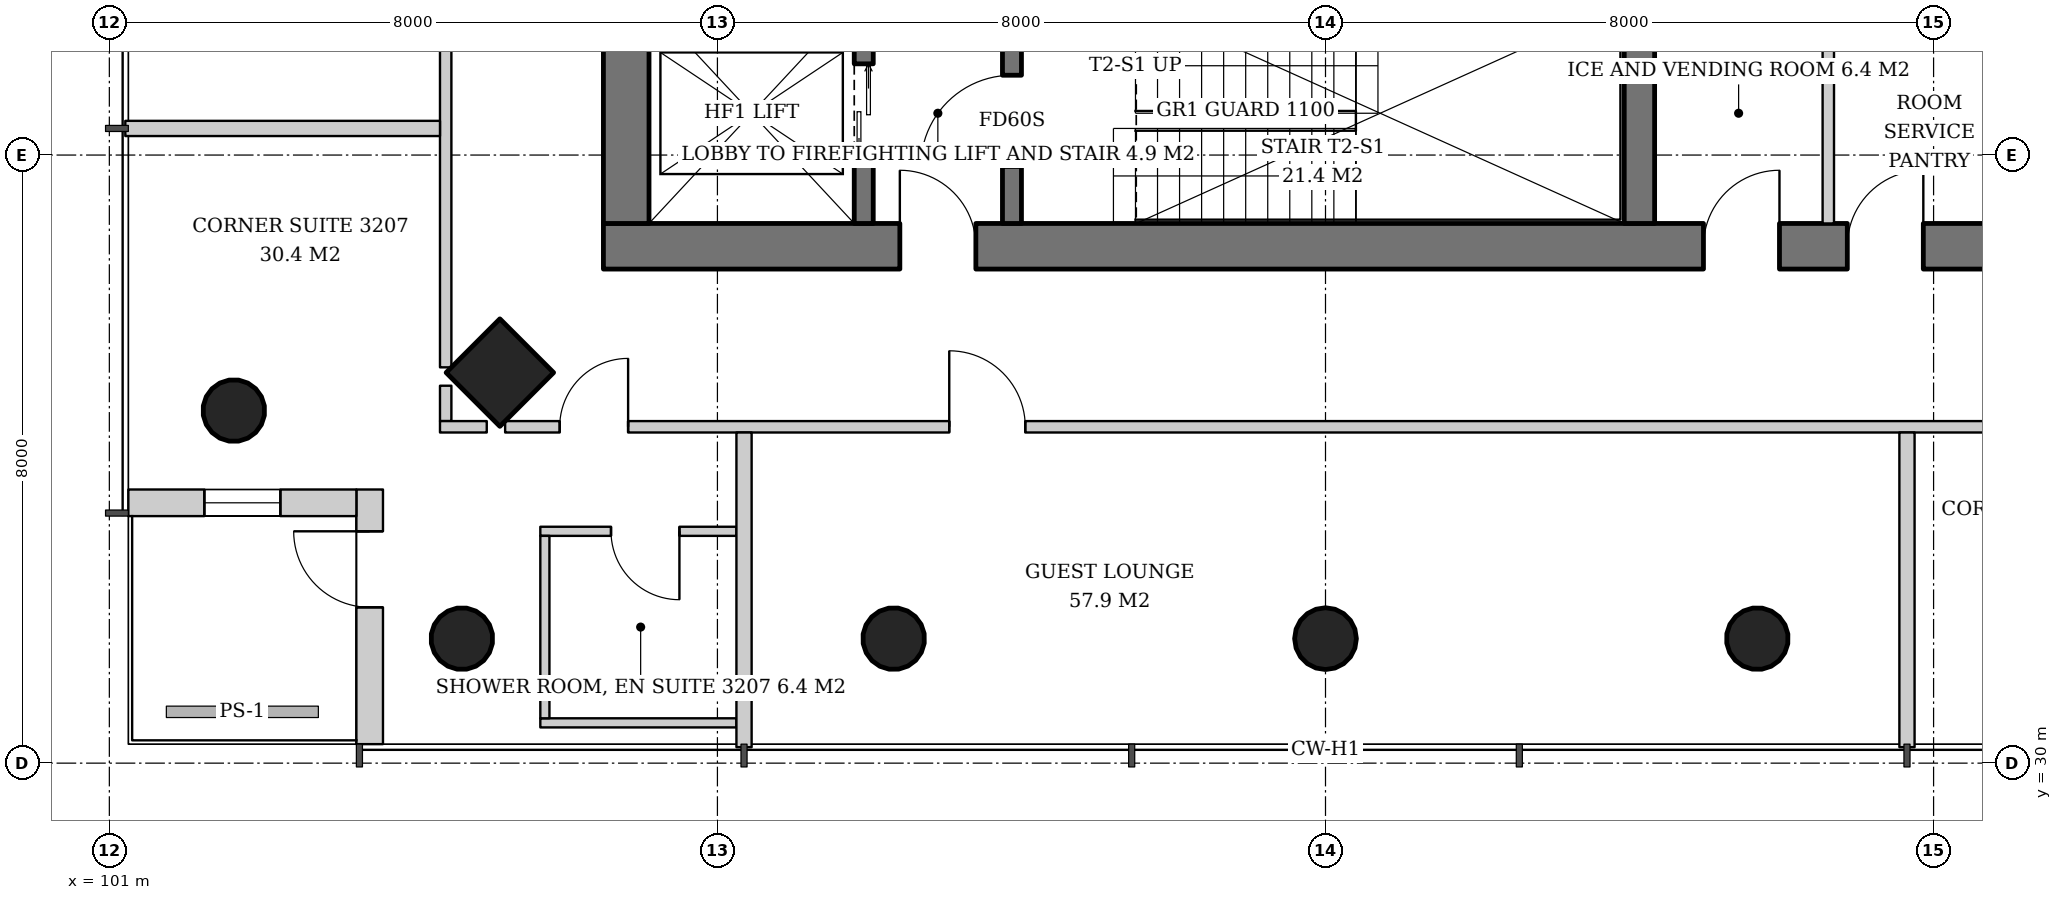
"""IFC4 building model, lengths in metres.
Left out: names, types, materials, properties, quantities, classifications, styles, units other than length and angle.
Written with IfcOpenShell. Run it as: python <this file> out.ifc"""

import sys

from ifc_helpers import new_model, si_unit, direction, frame, frame_2d, origin, origin_2d, place, context, subcontext, project, spatial, rectangle, hollow_circle, extrude, element, fill, save


model = new_model("IFC4")
c1 = context("Model", 3, precision=1e-05, world=origin(), true_north=direction((0.0, 1.0)))
c2 = subcontext(c1, "Body", "Model", "MODEL_VIEW")
j1 = project(units=[si_unit("LENGTHUNIT", "METRE"), si_unit("PLANEANGLEUNIT", "RADIAN")], contexts=[c1])
p1 = place(None, origin())
s1 = spatial("IfcSite", under=j1, at=p1, CompositionType="ELEMENT")
p2 = place(p1, origin())
s2 = spatial("IfcBuilding", under=s1, at=p2, CompositionType="ELEMENT")
p3 = place(p2, frame((0.0, 0.0, 127.4)))
s3 = spatial("IfcBuildingStorey", under=s2, at=p3, CompositionType="ELEMENT", Elevation=127.4)
p4 = place(p3, frame((106.086, 35.086, 0.0), z_axis=(0.043029647111, 0.043029647111, 0.998146732169), x_axis=(-0.707106781187, 0.707106781187, 0.0)))
e1 = element("IfcColumn", 1, at=p4, inside=s3, PredefinedType="COLUMN", context=c2, shape_type="SweptSolid", body=[
    extrude(rectangle(XDim=1.0, YDim=1.0, at=origin_2d()), origin(), (0.0, 0.0, 1.0), 3.807),
])
for number, where, z_axis, x_axis in (
    (2, (102.586, 34.586, 0.0), (0.043, 0.043, 0.998), (-0.707, 0.707, 0.0)),
    (3, (105.586, 31.586, 0.0), (0.043, 0.043, 0.998), (-0.707, 0.707, 0.0)),
):
    element("IfcColumn", number, at=place(p3, frame(where, z_axis=z_axis, x_axis=x_axis)), inside=s3, PredefinedType="COLUMN", context=c2, shape_type="SweptSolid", body=[
        extrude(hollow_circle(Radius=0.406, WallThickness=0.03, at=origin_2d()), origin(), (0.0, 0.0, 1.0), 3.807),
    ])
p5 = place(p3, frame((111.293, 31.586, 0.0), z_axis=(0.021497706284, 0.043059584825, 0.998841188968), x_axis=(-0.894693706707, 0.446680166538, 0.0)))
e4 = element("IfcColumn", 4, at=p5, inside=s3, PredefinedType="COLUMN", context=c2, shape_type="SweptSolid", body=[
    extrude(hollow_circle(Radius=0.406, WallThickness=0.03, at=origin_2d()), origin(), (0.0, 0.0, 1.0), 3.804),
])
p6 = place(p3, frame((117.0, 31.586, 0.0), z_axis=(0.0, 0.043069538298, 0.999072076915), x_axis=(-1.0, 0.0, 0.0)))
e5 = element("IfcColumn", 5, at=p6, inside=s3, PredefinedType="COLUMN", context=c2, shape_type="SweptSolid", body=[
    extrude(hollow_circle(Radius=0.406, WallThickness=0.03, at=origin_2d()), origin(), (0.0, 0.0, 1.0), 3.803),
])
p7 = place(p3, frame((122.707, 31.586, 0.0), z_axis=(-0.021497706284, 0.043059584825, 0.998841188968), x_axis=(-0.894693706707, -0.446680166538, 0.0)))
e6 = element("IfcColumn", 6, at=p7, inside=s3, PredefinedType="COLUMN", context=c2, shape_type="SweptSolid", body=[
    extrude(hollow_circle(Radius=0.406, WallThickness=0.03, at=origin_2d()), origin(), (0.0, 0.0, 1.0), 3.804),
])
p8 = place(p3, frame((107.5, 36.8, 0.0), z_axis=(0.0, 0.0, 1.0), x_axis=(1.0, 0.0, 0.0)))
e7 = element("IfcWall", 7, at=p8, inside=s3, PredefinedType="SHEAR", context=c2, shape_type="SweptSolid", body=[
    extrude(rectangle(XDim=19.0, YDim=0.6, at=frame_2d((9.5, 0.0))), origin(), (0.0, 0.0, 1.0), 3.8),
])
p9 = place(p8, frame((3.9, 0.0, 0.0)))
e8 = element("IfcOpeningElement", 8, at=p9, cuts=e7, PredefinedType="OPENING", context=c2, shape_type="SweptSolid", body=[
    extrude(rectangle(XDim=1.0, YDim=2.1, at=frame_2d((0.5, 1.05))), frame((0.0, 0.31, 0.0), z_axis=(0.0, -1.0, 0.0), x_axis=(1.0, 0.0, 0.0)), (0.0, 0.0, 1.0), 0.62),
])
p10 = place(p8, frame((14.472, 0.0, 0.0)))
e9 = element("IfcOpeningElement", 9, at=p10, cuts=e7, PredefinedType="OPENING", context=c2, shape_type="SweptSolid", body=[
    extrude(rectangle(XDim=1.0, YDim=2.1, at=frame_2d((0.5, 1.05))), frame((0.0, 0.31, 0.0), z_axis=(0.0, -1.0, 0.0), x_axis=(1.0, 0.0, 0.0)), (0.0, 0.0, 1.0), 0.62),
])
p11 = place(p8, frame((16.365, 0.0, 0.0)))
e10 = element("IfcOpeningElement", 10, at=p11, cuts=e7, PredefinedType="OPENING", context=c2, shape_type="SweptSolid", body=[
    extrude(rectangle(XDim=1.0, YDim=2.1, at=frame_2d((0.5, 1.05))), frame((0.0, 0.31, 0.0), z_axis=(0.0, -1.0, 0.0), x_axis=(1.0, 0.0, 0.0)), (0.0, 0.0, 1.0), 0.62),
])
p12 = place(p3, frame((107.8, 37.1, 0.0), z_axis=(0.0, 0.0, 1.0), x_axis=(0.0, 1.0, 0.0)))
e11 = element("IfcWall", 11, at=p12, inside=s3, PredefinedType="SHEAR", context=c2, shape_type="SweptSolid", body=[
    extrude(rectangle(XDim=17.8, YDim=0.6, at=frame_2d((8.9, 0.0))), origin(), (0.0, 0.0, 1.0), 3.8),
])
p13 = place(p12, frame((8.0, 0.0, 0.0)))
e12 = element("IfcOpeningElement", 12, at=p13, cuts=e11, PredefinedType="OPENING", context=c2, shape_type="SweptSolid", body=[
    extrude(rectangle(XDim=1.8, YDim=2.4, at=frame_2d((0.9, 1.2))), frame((0.0, 0.31, 0.0), z_axis=(0.0, -1.0, 0.0), x_axis=(1.0, 0.0, 0.0)), (0.0, 0.0, 1.0), 0.62),
])
p14 = place(p3, frame((121.13, 37.1, 0.0), z_axis=(0.0, 0.0, 1.0), x_axis=(0.0, 1.0, 0.0)))
e13 = element("IfcWall", 13, at=p14, inside=s3, PredefinedType="SHEAR", context=c2, shape_type="SweptSolid", body=[
    extrude(rectangle(XDim=2.9, YDim=0.4, at=frame_2d((1.45, 0.0))), origin(), (0.0, 0.0, 1.0), 3.8),
])
p15 = place(p3, frame((104.425, 30.25, 0.0), z_axis=(0.0, 0.0, 1.0), x_axis=(0.0, 1.0, 0.0)))
e14 = element("IfcWall", 14, at=p15, inside=s3, PredefinedType="SOLIDWALL", context=c2, shape_type="SweptSolid", body=[
    extrude(rectangle(XDim=3.35, YDim=0.35, at=frame_2d((1.675, 0.0))), origin(), (0.0, 0.0, 1.0), 3.35),
])
p16 = place(p15, frame((1.8, 0.0, 0.0)))
e15 = element("IfcOpeningElement", 15, at=p16, cuts=e14, PredefinedType="OPENING", context=c2, shape_type="SweptSolid", body=[
    extrude(rectangle(XDim=1.0, YDim=2.4, at=frame_2d((0.5, 1.2))), frame((0.0, 0.185, 0.0), z_axis=(0.0, -1.0, 0.0), x_axis=(1.0, 0.0, 0.0)), (0.0, 0.0, 1.0), 0.37),
])
p17 = place(p3, frame((104.25, 33.425, 0.0), z_axis=(0.0, 0.0, 1.0), x_axis=(-1.0, 0.0, 0.0)))
e16 = element("IfcWall", 16, at=p17, inside=s3, PredefinedType="SOLIDWALL", context=c2, shape_type="SweptSolid", body=[
    extrude(rectangle(XDim=3.0, YDim=0.35, at=frame_2d((1.5, 0.0))), origin(), (0.0, 0.0, 1.0), 3.35),
])
p18 = place(p17, frame((1.0, 0.0, 0.65)))
e17 = element("IfcOpeningElement", 17, at=p18, cuts=e16, PredefinedType="OPENING", context=c2, shape_type="SweptSolid", body=[
    extrude(rectangle(XDim=1.0, YDim=2.4, at=frame_2d((0.5, 1.2))), frame((0.0, 0.185, 0.0), z_axis=(0.0, -1.0, 0.0), x_axis=(1.0, 0.0, 0.0)), (0.0, 0.0, 1.0), 0.37),
])
p19 = place(p3, frame((110.925, 37.1, 0.0), z_axis=(0.0, 0.0, 1.0), x_axis=(0.0, 1.0, 0.0)))
e18 = element("IfcWall", 18, at=p19, inside=s3, PredefinedType="SHEAR", context=c2, shape_type="SweptSolid", body=[
    extrude(rectangle(XDim=2.9, YDim=0.25, at=frame_2d((1.45, 0.0))), origin(), (0.0, 0.0, 1.0), 3.8),
])
p20 = place(p19, frame((0.8, 0.0, 0.0)))
e19 = element("IfcOpeningElement", 19, at=p20, cuts=e18, PredefinedType="OPENING", context=c2, shape_type="SweptSolid", body=[
    extrude(rectangle(XDim=1.3, YDim=2.2, at=frame_2d((0.65, 1.1))), frame((0.0, 0.135, 0.0), z_axis=(0.0, -1.0, 0.0), x_axis=(1.0, 0.0, 0.0)), (0.0, 0.0, 1.0), 0.27),
])
p21 = place(p3, frame((112.875, 37.1, 0.0), z_axis=(0.0, 0.0, 1.0), x_axis=(0.0, 1.0, 0.0)))
e20 = element("IfcWall", 20, at=p21, inside=s3, PredefinedType="SHEAR", context=c2, shape_type="SweptSolid", body=[
    extrude(rectangle(XDim=2.9, YDim=0.25, at=frame_2d((1.45, 0.0))), origin(), (0.0, 0.0, 1.0), 3.8),
])
p22 = place(p21, frame((0.75, 0.0, 0.0)))
e21 = element("IfcOpeningElement", 21, at=p22, cuts=e20, PredefinedType="OPENING", context=c2, shape_type="SweptSolid", body=[
    extrude(rectangle(XDim=1.2, YDim=2.1, at=frame_2d((0.6, 1.05))), frame((0.0, 0.135, 0.0), z_axis=(0.0, -1.0, 0.0), x_axis=(1.0, 0.0, 0.0)), (0.0, 0.0, 1.0), 0.27),
])
p23 = place(p3, frame((123.615, 37.1, 0.0), z_axis=(0.0, 0.0, 1.0), x_axis=(0.0, 1.0, 0.0)))
e22 = element("IfcWall", 22, at=p23, inside=s3, PredefinedType="SOLIDWALL", context=c2, shape_type="SweptSolid", body=[
    extrude(rectangle(XDim=2.9, YDim=0.15, at=frame_2d((1.45, 0.0))), origin(), (0.0, 0.0, 1.0), 3.35),
])
p24 = place(p3, frame((105.425, 56.793, 0.0), z_axis=(0.0, 0.0, 1.0), x_axis=(0.0, -1.0, 0.0)))
e23 = element("IfcWall", 23, at=p24, inside=s3, PredefinedType="PARTITIONING", context=c2, shape_type="SweptSolid", body=[
    extrude(rectangle(XDim=21.586, YDim=0.15, at=frame_2d((10.793, 0.0))), origin(), (0.0, 0.0, 1.0), 2.338),
])
p25 = place(p24, frame((0.718, 0.0, 0.0)))
e24 = element("IfcOpeningElement", 24, at=p25, cuts=e23, PredefinedType="OPENING", context=c2, shape_type="SweptSolid", body=[
    extrude(rectangle(XDim=0.9, YDim=2.1, at=frame_2d((0.45, 1.05))), frame((0.0, 0.085, 0.0), z_axis=(0.0, -1.0, 0.0), x_axis=(1.0, 0.0, 0.0)), (0.0, 0.0, 1.0), 0.17),
])
p26 = place(p24, frame((5.843, 0.0, 0.0)))
e25 = element("IfcOpeningElement", 25, at=p26, cuts=e23, PredefinedType="OPENING", context=c2, shape_type="SweptSolid", body=[
    extrude(rectangle(XDim=1.0, YDim=2.1, at=frame_2d((0.5, 1.05))), frame((0.0, 0.085, 0.0), z_axis=(0.0, -1.0, 0.0), x_axis=(1.0, 0.0, 0.0)), (0.0, 0.0, 1.0), 0.17),
])
p27 = place(p24, frame((10.993, 0.0, 0.0)))
e26 = element("IfcOpeningElement", 26, at=p27, cuts=e23, PredefinedType="OPENING", context=c2, shape_type="SweptSolid", body=[
    extrude(rectangle(XDim=0.9, YDim=2.1, at=frame_2d((0.45, 1.05))), frame((0.0, 0.085, 0.0), z_axis=(0.0, -1.0, 0.0), x_axis=(1.0, 0.0, 0.0)), (0.0, 0.0, 1.0), 0.17),
])
p28 = place(p3, frame((105.425, 34.965, 0.0), z_axis=(0.0, 0.0, 1.0), x_axis=(0.0, -1.0, 0.0)))
e27 = element("IfcWall", 27, at=p28, inside=s3, PredefinedType="PARTITIONING", context=c2, shape_type="SweptSolid", body=[
    extrude(rectangle(XDim=0.465, YDim=0.15, at=frame_2d((0.233, 0.0))), origin(), (0.0, 0.0, 1.0), 3.35),
])
p29 = place(p3, frame((105.35, 38.35, 0.0), z_axis=(0.0, 0.0, 1.0), x_axis=(-1.0, 0.0, 0.0)))
e28 = element("IfcWall", 28, at=p29, inside=s3, PredefinedType="PARTITIONING", context=c2, shape_type="SweptSolid", body=[
    extrude(rectangle(XDim=4.14, YDim=0.2, at=frame_2d((2.07, 0.0))), origin(), (0.0, 0.0, 1.0), 2.35),
])
p30 = place(p3, frame((109.25, 33.05, 0.0), z_axis=(0.0, 0.0, 1.0), x_axis=(-1.0, 0.0, 0.0)))
e29 = element("IfcWall", 29, at=p30, inside=s3, PredefinedType="PARTITIONING", context=c2, shape_type="SweptSolid", body=[
    extrude(rectangle(XDim=2.58, YDim=0.12, at=frame_2d((1.29, 0.0))), origin(), (0.0, 0.0, 1.0), 2.338),
])
p31 = place(p30, frame((0.75, 0.0, 0.0)))
e30 = element("IfcOpeningElement", 30, at=p31, cuts=e29, PredefinedType="OPENING", context=c2, shape_type="SweptSolid", body=[
    extrude(rectangle(XDim=0.9, YDim=2.1, at=frame_2d((0.45, 1.05))), frame((0.0, 0.07, 0.0), z_axis=(0.0, -1.0, 0.0), x_axis=(1.0, 0.0, 0.0)), (0.0, 0.0, 1.0), 0.14),
])
p32 = place(p3, frame((109.25, 30.53, 0.0), z_axis=(0.0, 0.0, 1.0), x_axis=(-1.0, 0.0, 0.0)))
e31 = element("IfcWall", 31, at=p32, inside=s3, PredefinedType="PARTITIONING", context=c2, shape_type="SweptSolid", body=[
    extrude(rectangle(XDim=2.58, YDim=0.12, at=frame_2d((1.29, 0.0))), origin(), (0.0, 0.0, 1.0), 3.35),
])
p33 = place(p3, frame((106.73, 32.99, 0.0), z_axis=(0.0, 0.0, 1.0), x_axis=(0.0, -1.0, 0.0)))
e32 = element("IfcWall", 32, at=p33, inside=s3, PredefinedType="PARTITIONING", context=c2, shape_type="SweptSolid", body=[
    extrude(rectangle(XDim=2.4, YDim=0.12, at=frame_2d((1.2, 0.0))), origin(), (0.0, 0.0, 1.0), 2.35),
])
p34 = place(p3, frame((105.35, 34.425, 0.0), z_axis=(0.0, 0.0, 1.0), x_axis=(1.0, 0.0, 0.0)))
e33 = element("IfcWall", 33, at=p34, inside=s3, PredefinedType="PARTITIONING", context=c2, shape_type="SweptSolid", body=[
    extrude(rectangle(XDim=0.615, YDim=0.15, at=frame_2d((0.308, 0.0))), origin(), (0.0, 0.0, 1.0), 3.35),
])
p35 = place(p3, frame((106.207, 34.425, 0.0), z_axis=(0.0, 0.0, 1.0), x_axis=(1.0, 0.0, 0.0)))
e34 = element("IfcWall", 34, at=p35, inside=s3, PredefinedType="PARTITIONING", context=c2, shape_type="SweptSolid", body=[
    extrude(rectangle(XDim=21.586, YDim=0.15, at=frame_2d((10.793, 0.0))), origin(), (0.0, 0.0, 1.0), 2.338),
])
p36 = place(p35, frame((0.718, 0.0, 0.0)))
e35 = element("IfcOpeningElement", 35, at=p36, cuts=e34, PredefinedType="OPENING", context=c2, shape_type="SweptSolid", body=[
    extrude(rectangle(XDim=0.9, YDim=2.1, at=frame_2d((0.45, 1.05))), frame((0.0, 0.085, 0.0), z_axis=(0.0, -1.0, 0.0), x_axis=(1.0, 0.0, 0.0)), (0.0, 0.0, 1.0), 0.17),
])
p37 = place(p35, frame((5.843, 0.0, 0.0)))
e36 = element("IfcOpeningElement", 36, at=p37, cuts=e34, PredefinedType="OPENING", context=c2, shape_type="SweptSolid", body=[
    extrude(rectangle(XDim=1.0, YDim=2.1, at=frame_2d((0.5, 1.05))), frame((0.0, 0.085, 0.0), z_axis=(0.0, -1.0, 0.0), x_axis=(1.0, 0.0, 0.0)), (0.0, 0.0, 1.0), 0.17),
])
for number, where, z_axis, x_axis in (
    (37, (109.35, 34.35, 0.0), (0.0, 0.0, 1.0), (0.0, -1.0, 0.0)),
    (38, (124.65, 34.35, 0.0), (0.0, 0.0, 1.0), (0.0, -1.0, 0.0)),
):
    element("IfcWall", number, at=place(p3, frame(where, z_axis=z_axis, x_axis=x_axis)), inside=s3, PredefinedType="PARTITIONING", context=c2, shape_type="SweptSolid", body=[
        extrude(rectangle(XDim=4.14, YDim=0.2, at=frame_2d((2.07, 0.0))), origin(), (0.0, 0.0, 1.0), 2.35),
    ])
p38 = place(p16, origin())
e39 = element("IfcDoor", 39, at=p38, inside=s3, OperationType="SINGLE_SWING_RIGHT", PredefinedType="DOOR", context=c2, shape_type="SweptSolid", body=[
    extrude(rectangle(XDim=1.0, YDim=2.4, at=frame_2d((0.5, 1.2))), frame((0.0, 0.025, 0.0), z_axis=(0.0, -1.0, 0.0), x_axis=(1.0, 0.0, 0.0)), (0.0, 0.0, 1.0), 0.05),
])
fill(e15, e39)
p39 = place(p18, origin())
e40 = element("IfcWindow", 40, at=p39, inside=s3, PartitioningType="SINGLE_PANEL", PredefinedType="WINDOW", context=c2, shape_type="SweptSolid", body=[
    extrude(rectangle(XDim=1.0, YDim=2.4, at=frame_2d((0.5, 1.2))), frame((0.0, 0.03, 0.0), z_axis=(0.0, -1.0, 0.0), x_axis=(1.0, 0.0, 0.0)), (0.0, 0.0, 1.0), 0.06),
])
fill(e17, e40)
p40 = place(p20, origin())
e41 = element("IfcDoor", 41, at=p40, inside=s3, OperationType="DOUBLE_DOOR_SLIDING", PredefinedType="DOOR", context=c2, shape_type="SweptSolid", body=[
    extrude(rectangle(XDim=1.3, YDim=2.2, at=frame_2d((0.65, 1.1))), frame((0.0, 0.025, 0.0), z_axis=(0.0, -1.0, 0.0), x_axis=(1.0, 0.0, 0.0)), (0.0, 0.0, 1.0), 0.05),
])
fill(e19, e41)
p41 = place(p22, origin())
e42 = element("IfcDoor", 42, at=p41, inside=s3, OperationType="SINGLE_SWING_LEFT", PredefinedType="DOOR", context=c2, shape_type="SweptSolid", body=[
    extrude(rectangle(XDim=1.2, YDim=2.1, at=frame_2d((0.6, 1.05))), frame((0.0, 0.025, 0.0), z_axis=(0.0, -1.0, 0.0), x_axis=(1.0, 0.0, 0.0)), (0.0, 0.0, 1.0), 0.05),
])
fill(e21, e42)
p42 = place(p9, origin())
e43 = element("IfcDoor", 43, at=p42, inside=s3, OperationType="SINGLE_SWING_LEFT", PredefinedType="DOOR", context=c2, shape_type="SweptSolid", body=[
    extrude(rectangle(XDim=1.0, YDim=2.1, at=frame_2d((0.5, 1.05))), frame((0.0, 0.025, 0.0), z_axis=(0.0, -1.0, 0.0), x_axis=(1.0, 0.0, 0.0)), (0.0, 0.0, 1.0), 0.05),
])
fill(e8, e43)
p43 = place(p10, origin())
e44 = element("IfcDoor", 44, at=p43, inside=s3, OperationType="SINGLE_SWING_RIGHT", PredefinedType="DOOR", context=c2, shape_type="SweptSolid", body=[
    extrude(rectangle(XDim=1.0, YDim=2.1, at=frame_2d((0.5, 1.05))), frame((0.0, 0.29, 0.0), z_axis=(0.0, -1.0, 0.0), x_axis=(1.0, 0.0, 0.0)), (0.0, 0.0, 1.0), 0.05),
])
fill(e9, e44)
p44 = place(p11, origin())
e45 = element("IfcDoor", 45, at=p44, inside=s3, OperationType="SINGLE_SWING_RIGHT", PredefinedType="DOOR", context=c2, shape_type="SweptSolid", body=[
    extrude(rectangle(XDim=1.0, YDim=2.1, at=frame_2d((0.5, 1.05))), frame((0.0, 0.29, 0.0), z_axis=(0.0, -1.0, 0.0), x_axis=(1.0, 0.0, 0.0)), (0.0, 0.0, 1.0), 0.05),
])
fill(e10, e45)
p45 = place(p31, origin())
e46 = element("IfcDoor", 46, at=p45, inside=s3, OperationType="SINGLE_SWING_LEFT", PredefinedType="DOOR", context=c2, shape_type="SweptSolid", body=[
    extrude(rectangle(XDim=0.9, YDim=2.1, at=frame_2d((0.45, 1.05))), frame((0.0, 0.025, 0.0), z_axis=(0.0, -1.0, 0.0), x_axis=(1.0, 0.0, 0.0)), (0.0, 0.0, 1.0), 0.05),
])
fill(e30, e46)
p46 = place(p36, origin())
e47 = element("IfcDoor", 47, at=p46, inside=s3, OperationType="SINGLE_SWING_RIGHT", PredefinedType="DOOR", context=c2, shape_type="SweptSolid", body=[
    extrude(rectangle(XDim=0.9, YDim=2.1, at=frame_2d((0.45, 1.05))), frame((0.0, 0.025, 0.0), z_axis=(0.0, -1.0, 0.0), x_axis=(1.0, 0.0, 0.0)), (0.0, 0.0, 1.0), 0.05),
])
fill(e35, e47)
p47 = place(p37, origin())
e48 = element("IfcDoor", 48, at=p47, inside=s3, OperationType="SINGLE_SWING_LEFT", PredefinedType="DOOR", context=c2, shape_type="SweptSolid", body=[
    extrude(rectangle(XDim=1.0, YDim=2.1, at=frame_2d((0.5, 1.05))), frame((0.0, 0.025, 0.0), z_axis=(0.0, -1.0, 0.0), x_axis=(1.0, 0.0, 0.0)), (0.0, 0.0, 1.0), 0.05),
])
fill(e36, e48)
save(model, sys.argv[1])
